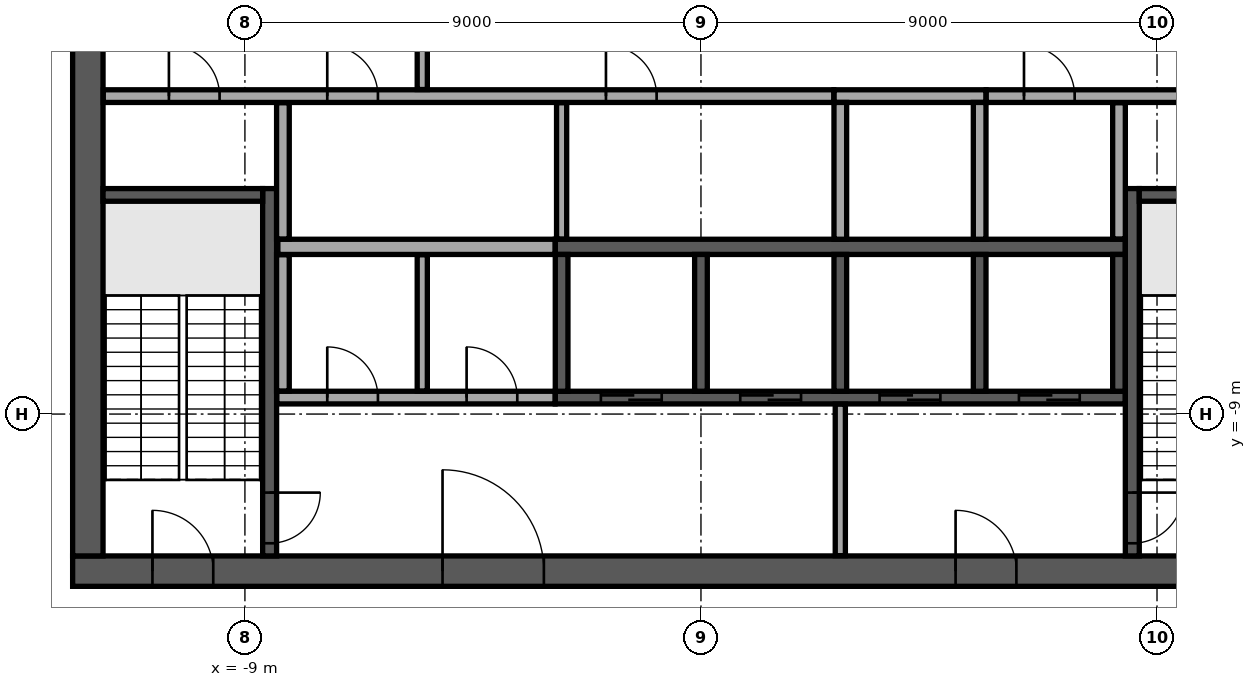
"""IFC4 building model, lengths in metres.
Left out: names, types, materials, properties, quantities, classifications, styles, units other than length and angle.
Written with IfcOpenShell. Run it as: python <this file> out.ifc"""

import sys

from ifc_helpers import new_model, si_unit, direction, frame, frame_2d, origin, place, context, subcontext, project, spatial, rectangle, extrude, element, fill, save


model = new_model("IFC4")
c1 = context("Model", 3, precision=1e-05, world=origin(), true_north=direction((0.0, 1.0)))
c2 = subcontext(c1, "Body", "Model", "MODEL_VIEW")
j1 = project(units=[si_unit("LENGTHUNIT", "METRE"), si_unit("PLANEANGLEUNIT", "RADIAN")], contexts=[c1])
p1 = place(None, origin())
s1 = spatial("IfcSite", under=j1, at=p1, CompositionType="ELEMENT")
p2 = place(p1, origin())
s2 = spatial("IfcBuilding", under=s1, at=p2, CompositionType="ELEMENT")
p3 = place(p2, frame((0.0, 0.0, 363.1)))
s3 = spatial("IfcBuildingStorey", under=s2, at=p3, CompositionType="ELEMENT", Elevation=363.1)
p4 = place(p3, frame((-12.4, -12.1, 0.0), z_axis=(0.0, 0.0, 1.0), x_axis=(1.0, 0.0, 0.0)))
e1 = element("IfcWall", 1, at=p4, inside=s3, PredefinedType="SHEAR", context=c2, shape_type="SweptSolid", body=[
    extrude(rectangle(XDim=24.8, YDim=0.6, at=frame_2d((12.4, 0.0))), origin(), (0.0, 0.0, 1.0), 4.7),
])
p5 = place(p4, frame((7.3, 0.0, 0.0)))
e2 = element("IfcOpeningElement", 2, at=p5, cuts=e1, PredefinedType="OPENING", context=c2, shape_type="SweptSolid", body=[
    extrude(rectangle(XDim=2.0, YDim=2.1, at=frame_2d((1.0, 1.05))), frame((0.0, 0.31, 0.0), z_axis=(0.0, -1.0, 0.0), x_axis=(1.0, 0.0, 0.0)), (0.0, 0.0, 1.0), 0.62),
])
p6 = place(p4, frame((17.425, 0.0, 0.0)))
e3 = element("IfcOpeningElement", 3, at=p6, cuts=e1, PredefinedType="OPENING", context=c2, shape_type="SweptSolid", body=[
    extrude(rectangle(XDim=1.2, YDim=2.1, at=frame_2d((0.6, 1.05))), frame((0.0, 0.31, 0.0), z_axis=(0.0, -1.0, 0.0), x_axis=(1.0, 0.0, 0.0)), (0.0, 0.0, 1.0), 0.62),
])
p7 = place(p4, frame((1.575, 0.0, 0.0)))
e4 = element("IfcOpeningElement", 4, at=p7, cuts=e1, PredefinedType="OPENING", context=c2, shape_type="SweptSolid", body=[
    extrude(rectangle(XDim=1.2, YDim=2.1, at=frame_2d((0.6, 1.05))), frame((0.0, 0.31, 0.0), z_axis=(0.0, -1.0, 0.0), x_axis=(1.0, 0.0, 0.0)), (0.0, 0.0, 1.0), 0.62),
])
p8 = place(p4, frame((22.025, 0.0, 0.0)))
e5 = element("IfcOpeningElement", 5, at=p8, cuts=e1, PredefinedType="OPENING", context=c2, shape_type="SweptSolid", body=[
    extrude(rectangle(XDim=1.2, YDim=2.1, at=frame_2d((0.6, 1.05))), frame((0.0, 0.31, 0.0), z_axis=(0.0, -1.0, 0.0), x_axis=(1.0, 0.0, 0.0)), (0.0, 0.0, 1.0), 0.62),
])
p9 = place(p3, frame((-12.1, -11.8, 0.0), z_axis=(0.0, 0.0, 1.0), x_axis=(0.0, 1.0, 0.0)))
e6 = element("IfcWall", 6, at=p9, inside=s3, PredefinedType="SHEAR", context=c2, shape_type="SweptSolid", body=[
    extrude(rectangle(XDim=23.6, YDim=0.6, at=frame_2d((11.8, 0.0))), origin(), (0.0, 0.0, 1.0), 4.7),
])
p10 = place(p9, frame((10.6, 0.0, 0.0)))
e7 = element("IfcOpeningElement", 7, at=p10, cuts=e6, PredefinedType="OPENING", context=c2, shape_type="SweptSolid", body=[
    extrude(rectangle(XDim=2.4, YDim=2.4, at=frame_2d((1.2, 1.2))), frame((0.0, 0.31, 0.0), z_axis=(0.0, -1.0, 0.0), x_axis=(1.0, 0.0, 0.0)), (0.0, 0.0, 1.0), 0.62),
])
p11 = place(p3, frame((-2.875, -5.7, 0.0), z_axis=(0.0, 0.0, 1.0), x_axis=(1.0, 0.0, 0.0)))
e8 = element("IfcWall", 8, at=p11, inside=s3, PredefinedType="SOLIDWALL", context=c2, shape_type="SweptSolid", body=[
    extrude(rectangle(XDim=11.25, YDim=0.3, at=frame_2d((5.625, 0.0))), origin(), (0.0, 0.0, 1.0), 4.7),
])
p12 = place(p3, frame((2.625, -2.725, 0.0), z_axis=(0.0, 0.0, 1.0), x_axis=(1.0, 0.0, 0.0)))
e9 = element("IfcWall", 9, at=p12, inside=s3, PredefinedType="SOLIDWALL", context=c2, shape_type="SweptSolid", body=[
    extrude(rectangle(XDim=3.0, YDim=0.25, at=frame_2d((1.5, 0.0))), origin(), (0.0, 0.0, 1.0), 4.7),
])
for number, where, z_axis, x_axis in (
    (10, (2.75, -5.55, 0.0), (0.0, 0.0, 1.0), (0.0, 1.0, 0.0)),
    (11, (5.5, -5.55, 0.0), (0.0, 0.0, 1.0), (0.0, 1.0, 0.0)),
):
    element("IfcWall", number, at=place(p3, frame(where, z_axis=z_axis, x_axis=x_axis)), inside=s3, PredefinedType="SOLIDWALL", context=c2, shape_type="SweptSolid", body=[
        extrude(rectangle(XDim=2.7, YDim=0.25, at=frame_2d((1.35, 0.0))), origin(), (0.0, 0.0, 1.0), 4.7),
    ])
p13 = place(p3, frame((-2.875, -8.675, 0.0), z_axis=(0.0, 0.0, 1.0), x_axis=(1.0, 0.0, 0.0)))
e12 = element("IfcWall", 12, at=p13, inside=s3, PredefinedType="SOLIDWALL", context=c2, shape_type="SweptSolid", body=[
    extrude(rectangle(XDim=11.25, YDim=0.25, at=frame_2d((5.625, 0.0))), origin(), (0.0, 0.0, 1.0), 4.7),
])
p14 = place(p13, frame((0.9, 0.0, 0.0)))
e13 = element("IfcOpeningElement", 13, at=p14, cuts=e12, PredefinedType="OPENING", context=c2, shape_type="SweptSolid", body=[
    extrude(rectangle(XDim=1.2, YDim=2.1, at=frame_2d((0.6, 1.05))), frame((0.0, 0.135, 0.0), z_axis=(0.0, -1.0, 0.0), x_axis=(1.0, 0.0, 0.0)), (0.0, 0.0, 1.0), 0.27),
])
p15 = place(p13, frame((3.65, 0.0, 0.0)))
e14 = element("IfcOpeningElement", 14, at=p15, cuts=e12, PredefinedType="OPENING", context=c2, shape_type="SweptSolid", body=[
    extrude(rectangle(XDim=1.2, YDim=2.1, at=frame_2d((0.6, 1.05))), frame((0.0, 0.135, 0.0), z_axis=(0.0, -1.0, 0.0), x_axis=(1.0, 0.0, 0.0)), (0.0, 0.0, 1.0), 0.27),
])
p16 = place(p13, frame((6.4, 0.0, 0.0)))
e15 = element("IfcOpeningElement", 15, at=p16, cuts=e12, PredefinedType="OPENING", context=c2, shape_type="SweptSolid", body=[
    extrude(rectangle(XDim=1.2, YDim=2.1, at=frame_2d((0.6, 1.05))), frame((0.0, 0.135, 0.0), z_axis=(0.0, -1.0, 0.0), x_axis=(1.0, 0.0, 0.0)), (0.0, 0.0, 1.0), 0.27),
])
p17 = place(p13, frame((9.15, 0.0, 0.0)))
e16 = element("IfcOpeningElement", 16, at=p17, cuts=e12, PredefinedType="OPENING", context=c2, shape_type="SweptSolid", body=[
    extrude(rectangle(XDim=1.2, YDim=2.1, at=frame_2d((0.6, 1.05))), frame((0.0, 0.135, 0.0), z_axis=(0.0, -1.0, 0.0), x_axis=(1.0, 0.0, 0.0)), (0.0, 0.0, 1.0), 0.27),
])
for number, where, z_axis, x_axis in (
    (17, (-2.75, -8.55, 0.0), (0.0, 0.0, 1.0), (0.0, 1.0, 0.0)),
    (18, (0.0, -8.55, 0.0), (0.0, 0.0, 1.0), (0.0, 1.0, 0.0)),
    (19, (2.75, -8.55, 0.0), (0.0, 0.0, 1.0), (0.0, 1.0, 0.0)),
    (20, (5.5, -8.55, 0.0), (0.0, 0.0, 1.0), (0.0, 1.0, 0.0)),
    (21, (8.25, -8.55, 0.0), (0.0, 0.0, 1.0), (0.0, 1.0, 0.0)),
):
    element("IfcWall", number, at=place(p3, frame(where, z_axis=z_axis, x_axis=x_axis)), inside=s3, PredefinedType="SOLIDWALL", context=c2, shape_type="SweptSolid", body=[
        extrude(rectangle(XDim=2.7, YDim=0.25, at=frame_2d((1.35, 0.0))), origin(), (0.0, 0.0, 1.0), 4.7),
    ])
p18 = place(p3, frame((-8.512, -4.55, 0.0), z_axis=(0.0, 0.0, 1.0), x_axis=(0.0, -1.0, 0.0)))
e22 = element("IfcWall", 22, at=p18, inside=s3, PredefinedType="SOLIDWALL", context=c2, shape_type="SweptSolid", body=[
    extrude(rectangle(XDim=7.25, YDim=0.275, at=frame_2d((3.625, 0.0))), origin(), (0.0, 0.0, 1.0), 4.7),
])
p19 = place(p18, frame((6.0, 0.0, 0.0)))
e23 = element("IfcOpeningElement", 23, at=p19, cuts=e22, PredefinedType="OPENING", context=c2, shape_type="SweptSolid", body=[
    extrude(rectangle(XDim=1.0, YDim=2.1, at=frame_2d((0.5, 1.05))), frame((0.0, 0.147, 0.0), z_axis=(0.0, -1.0, 0.0), x_axis=(1.0, 0.0, 0.0)), (0.0, 0.0, 1.0), 0.295),
])
p20 = place(p3, frame((-8.65, -4.675, 0.0), z_axis=(0.0, 0.0, 1.0), x_axis=(-1.0, 0.0, 0.0)))
e24 = element("IfcWall", 24, at=p20, inside=s3, PredefinedType="SOLIDWALL", context=c2, shape_type="SweptSolid", body=[
    extrude(rectangle(XDim=3.15, YDim=0.25, at=frame_2d((1.575, 0.0))), origin(), (0.0, 0.0, 1.0), 4.7),
])
p21 = place(p3, frame((8.512, -4.55, 0.0), z_axis=(0.0, 0.0, 1.0), x_axis=(0.0, -1.0, 0.0)))
e25 = element("IfcWall", 25, at=p21, inside=s3, PredefinedType="SOLIDWALL", context=c2, shape_type="SweptSolid", body=[
    extrude(rectangle(XDim=7.25, YDim=0.275, at=frame_2d((3.625, 0.0))), origin(), (0.0, 0.0, 1.0), 4.7),
])
p22 = place(p21, frame((6.0, 0.0, 0.0)))
e26 = element("IfcOpeningElement", 26, at=p22, cuts=e25, PredefinedType="OPENING", context=c2, shape_type="SweptSolid", body=[
    extrude(rectangle(XDim=1.0, YDim=2.1, at=frame_2d((0.5, 1.05))), frame((0.0, 0.147, 0.0), z_axis=(0.0, -1.0, 0.0), x_axis=(1.0, 0.0, 0.0)), (0.0, 0.0, 1.0), 0.295),
])
p23 = place(p3, frame((8.65, -4.675, 0.0), z_axis=(0.0, 0.0, 1.0), x_axis=(1.0, 0.0, 0.0)))
e27 = element("IfcWall", 27, at=p23, inside=s3, PredefinedType="SOLIDWALL", context=c2, shape_type="SweptSolid", body=[
    extrude(rectangle(XDim=3.15, YDim=0.25, at=frame_2d((1.575, 0.0))), origin(), (0.0, 0.0, 1.0), 4.7),
])
p24 = place(p3, frame((2.75, -11.795, 0.0), z_axis=(0.0, 0.0, 1.0), x_axis=(0.0, 1.0, 0.0)))
e28 = element("IfcWall", 28, at=p24, inside=s3, PredefinedType="PARTITIONING", context=c2, shape_type="SweptSolid", body=[
    extrude(rectangle(XDim=2.99, YDim=0.2, at=frame_2d((1.495, 0.0))), origin(), (0.0, 0.0, 1.0), 4.7),
])
p25 = place(p3, frame((-8.37, -8.675, 0.0), z_axis=(0.0, 0.0, 1.0), x_axis=(1.0, 0.0, 0.0)))
e29 = element("IfcWall", 29, at=p25, inside=s3, PredefinedType="PARTITIONING", context=c2, shape_type="SweptSolid", body=[
    extrude(rectangle(XDim=5.49, YDim=0.25, at=frame_2d((2.745, 0.0))), origin(), (0.0, 0.0, 1.0), 4.7),
])
p26 = place(p25, frame((0.995, 0.0, 0.0)))
e30 = element("IfcOpeningElement", 30, at=p26, cuts=e29, PredefinedType="OPENING", context=c2, shape_type="SweptSolid", body=[
    extrude(rectangle(XDim=1.0, YDim=2.1, at=frame_2d((0.5, 1.05))), frame((0.0, 0.135, 0.0), z_axis=(0.0, -1.0, 0.0), x_axis=(1.0, 0.0, 0.0)), (0.0, 0.0, 1.0), 0.27),
])
p27 = place(p25, frame((3.745, 0.0, 0.0)))
e31 = element("IfcOpeningElement", 31, at=p27, cuts=e29, PredefinedType="OPENING", context=c2, shape_type="SweptSolid", body=[
    extrude(rectangle(XDim=1.0, YDim=2.1, at=frame_2d((0.5, 1.05))), frame((0.0, 0.135, 0.0), z_axis=(0.0, -1.0, 0.0), x_axis=(1.0, 0.0, 0.0)), (0.0, 0.0, 1.0), 0.27),
])
p28 = place(p3, frame((-8.25, -8.545, 0.0), z_axis=(0.0, 0.0, 1.0), x_axis=(0.0, 1.0, 0.0)))
e32 = element("IfcWall", 32, at=p28, inside=s3, PredefinedType="PARTITIONING", context=c2, shape_type="SweptSolid", body=[
    extrude(rectangle(XDim=2.69, YDim=0.25, at=frame_2d((1.345, 0.0))), origin(), (0.0, 0.0, 1.0), 4.7),
])
p29 = place(p3, frame((-5.5, -8.545, 0.0), z_axis=(0.0, 0.0, 1.0), x_axis=(0.0, 1.0, 0.0)))
e33 = element("IfcWall", 33, at=p29, inside=s3, PredefinedType="PARTITIONING", context=c2, shape_type="SweptSolid", body=[
    extrude(rectangle(XDim=2.69, YDim=0.2, at=frame_2d((1.345, 0.0))), origin(), (0.0, 0.0, 1.0), 4.7),
])
p30 = place(p3, frame((-8.35, -5.7, 0.0), z_axis=(0.0, 0.0, 1.0), x_axis=(1.0, 0.0, 0.0)))
e34 = element("IfcWall", 34, at=p30, inside=s3, PredefinedType="PARTITIONING", context=c2, shape_type="SweptSolid", body=[
    extrude(rectangle(XDim=5.47, YDim=0.3, at=frame_2d((2.735, 0.0))), origin(), (0.0, 0.0, 1.0), 4.7),
])
p31 = place(p3, frame((-8.25, -5.545, 0.0), z_axis=(0.0, 0.0, 1.0), x_axis=(0.0, 1.0, 0.0)))
e35 = element("IfcWall", 35, at=p31, inside=s3, PredefinedType="PARTITIONING", context=c2, shape_type="SweptSolid", body=[
    extrude(rectangle(XDim=2.69, YDim=0.25, at=frame_2d((1.345, 0.0))), origin(), (0.0, 0.0, 1.0), 4.7),
])
p32 = place(p3, frame((-2.75, -5.545, 0.0), z_axis=(0.0, 0.0, 1.0), x_axis=(0.0, 1.0, 0.0)))
e36 = element("IfcWall", 36, at=p32, inside=s3, PredefinedType="PARTITIONING", context=c2, shape_type="SweptSolid", body=[
    extrude(rectangle(XDim=2.69, YDim=0.2, at=frame_2d((1.345, 0.0))), origin(), (0.0, 0.0, 1.0), 4.7),
])
p33 = place(p3, frame((8.25, -5.545, 0.0), z_axis=(0.0, 0.0, 1.0), x_axis=(0.0, 1.0, 0.0)))
e37 = element("IfcWall", 37, at=p33, inside=s3, PredefinedType="PARTITIONING", context=c2, shape_type="SweptSolid", body=[
    extrude(rectangle(XDim=2.69, YDim=0.25, at=frame_2d((1.345, 0.0))), origin(), (0.0, 0.0, 1.0), 4.7),
])
p34 = place(p3, frame((-11.795, -2.725, 0.0), z_axis=(0.0, 0.0, 1.0), x_axis=(1.0, 0.0, 0.0)))
e38 = element("IfcWall", 38, at=p34, inside=s3, PredefinedType="PARTITIONING", context=c2, shape_type="SweptSolid", body=[
    extrude(rectangle(XDim=14.415, YDim=0.25, at=frame_2d((7.208, 0.0))), origin(), (0.0, 0.0, 1.0), 4.7),
])
p35 = place(p34, frame((1.295, 0.0, 0.0)))
e39 = element("IfcOpeningElement", 39, at=p35, cuts=e38, PredefinedType="OPENING", context=c2, shape_type="SweptSolid", body=[
    extrude(rectangle(XDim=1.0, YDim=2.1, at=frame_2d((0.5, 1.05))), frame((0.0, 0.135, 0.0), z_axis=(0.0, -1.0, 0.0), x_axis=(1.0, 0.0, 0.0)), (0.0, 0.0, 1.0), 0.27),
])
p36 = place(p34, frame((4.42, 0.0, 0.0)))
e40 = element("IfcOpeningElement", 40, at=p36, cuts=e38, PredefinedType="OPENING", context=c2, shape_type="SweptSolid", body=[
    extrude(rectangle(XDim=1.0, YDim=2.1, at=frame_2d((0.5, 1.05))), frame((0.0, 0.135, 0.0), z_axis=(0.0, -1.0, 0.0), x_axis=(1.0, 0.0, 0.0)), (0.0, 0.0, 1.0), 0.27),
])
p37 = place(p34, frame((9.92, 0.0, 0.0)))
e41 = element("IfcOpeningElement", 41, at=p37, cuts=e38, PredefinedType="OPENING", context=c2, shape_type="SweptSolid", body=[
    extrude(rectangle(XDim=1.0, YDim=2.1, at=frame_2d((0.5, 1.05))), frame((0.0, 0.135, 0.0), z_axis=(0.0, -1.0, 0.0), x_axis=(1.0, 0.0, 0.0)), (0.0, 0.0, 1.0), 0.27),
])
p38 = place(p3, frame((5.63, -2.725, 0.0), z_axis=(0.0, 0.0, 1.0), x_axis=(1.0, 0.0, 0.0)))
e42 = element("IfcWall", 42, at=p38, inside=s3, PredefinedType="PARTITIONING", context=c2, shape_type="SweptSolid", body=[
    extrude(rectangle(XDim=6.165, YDim=0.25, at=frame_2d((3.083, 0.0))), origin(), (0.0, 0.0, 1.0), 4.7),
])
p39 = place(p38, frame((0.745, 0.0, 0.0)))
e43 = element("IfcOpeningElement", 43, at=p39, cuts=e42, PredefinedType="OPENING", context=c2, shape_type="SweptSolid", body=[
    extrude(rectangle(XDim=1.0, YDim=2.1, at=frame_2d((0.5, 1.05))), frame((0.0, 0.135, 0.0), z_axis=(0.0, -1.0, 0.0), x_axis=(1.0, 0.0, 0.0)), (0.0, 0.0, 1.0), 0.27),
])
p40 = place(p38, frame((3.92, 0.0, 0.0)))
e44 = element("IfcOpeningElement", 44, at=p40, cuts=e42, PredefinedType="OPENING", context=c2, shape_type="SweptSolid", body=[
    extrude(rectangle(XDim=0.9, YDim=2.1, at=frame_2d((0.45, 1.05))), frame((0.0, 0.135, 0.0), z_axis=(0.0, -1.0, 0.0), x_axis=(1.0, 0.0, 0.0)), (0.0, 0.0, 1.0), 0.27),
])
p41 = place(p3, frame((-5.5, -2.595, 0.0), z_axis=(0.0, 0.0, 1.0), x_axis=(0.0, 1.0, 0.0)))
e45 = element("IfcWall", 45, at=p41, inside=s3, PredefinedType="PARTITIONING", context=c2, shape_type="SweptSolid", body=[
    extrude(rectangle(XDim=5.19, YDim=0.2, at=frame_2d((2.595, 0.0))), origin(), (0.0, 0.0, 1.0), 4.7),
])
p42 = place(p41, frame((1.395, 0.0, 0.0)))
e46 = element("IfcOpeningElement", 46, at=p42, cuts=e45, PredefinedType="OPENING", context=c2, shape_type="SweptSolid", body=[
    extrude(rectangle(XDim=2.4, YDim=2.4, at=frame_2d((1.2, 1.2))), frame((0.0, 0.11, 0.0), z_axis=(0.0, -1.0, 0.0), x_axis=(1.0, 0.0, 0.0)), (0.0, 0.0, 1.0), 0.22),
])
p43 = place(p5, origin())
e47 = element("IfcDoor", 47, at=p43, inside=s3, OperationType="SINGLE_SWING_LEFT", PredefinedType="DOOR", context=c2, shape_type="SweptSolid", body=[
    extrude(rectangle(XDim=2.0, YDim=2.1, at=frame_2d((1.0, 1.05))), frame((0.0, 0.025, 0.0), z_axis=(0.0, -1.0, 0.0), x_axis=(1.0, 0.0, 0.0)), (0.0, 0.0, 1.0), 0.05),
])
fill(e2, e47)
p44 = place(p6, origin())
e48 = element("IfcDoor", 48, at=p44, inside=s3, OperationType="SINGLE_SWING_LEFT", PredefinedType="DOOR", context=c2, shape_type="SweptSolid", body=[
    extrude(rectangle(XDim=1.2, YDim=2.1, at=frame_2d((0.6, 1.05))), frame((0.0, 0.025, 0.0), z_axis=(0.0, -1.0, 0.0), x_axis=(1.0, 0.0, 0.0)), (0.0, 0.0, 1.0), 0.05),
])
fill(e3, e48)
p45 = place(p7, origin())
e49 = element("IfcDoor", 49, at=p45, inside=s3, OperationType="SINGLE_SWING_LEFT", PredefinedType="DOOR", context=c2, shape_type="SweptSolid", body=[
    extrude(rectangle(XDim=1.2, YDim=2.1, at=frame_2d((0.6, 1.05))), frame((0.0, 0.025, 0.0), z_axis=(0.0, -1.0, 0.0), x_axis=(1.0, 0.0, 0.0)), (0.0, 0.0, 1.0), 0.05),
])
fill(e4, e49)
p46 = place(p14, origin())
e50 = element("IfcDoor", 50, at=p46, inside=s3, OperationType="DOUBLE_DOOR_SLIDING", PredefinedType="DOOR", context=c2, shape_type="SweptSolid", body=[
    extrude(rectangle(XDim=1.2, YDim=2.1, at=frame_2d((0.6, 1.05))), frame((0.0, 0.025, 0.0), z_axis=(0.0, -1.0, 0.0), x_axis=(1.0, 0.0, 0.0)), (0.0, 0.0, 1.0), 0.05),
])
fill(e13, e50)
p47 = place(p15, origin())
e51 = element("IfcDoor", 51, at=p47, inside=s3, OperationType="DOUBLE_DOOR_SLIDING", PredefinedType="DOOR", context=c2, shape_type="SweptSolid", body=[
    extrude(rectangle(XDim=1.2, YDim=2.1, at=frame_2d((0.6, 1.05))), frame((0.0, 0.025, 0.0), z_axis=(0.0, -1.0, 0.0), x_axis=(1.0, 0.0, 0.0)), (0.0, 0.0, 1.0), 0.05),
])
fill(e14, e51)
p48 = place(p16, origin())
e52 = element("IfcDoor", 52, at=p48, inside=s3, OperationType="DOUBLE_DOOR_SLIDING", PredefinedType="DOOR", context=c2, shape_type="SweptSolid", body=[
    extrude(rectangle(XDim=1.2, YDim=2.1, at=frame_2d((0.6, 1.05))), frame((0.0, 0.025, 0.0), z_axis=(0.0, -1.0, 0.0), x_axis=(1.0, 0.0, 0.0)), (0.0, 0.0, 1.0), 0.05),
])
fill(e15, e52)
p49 = place(p17, origin())
e53 = element("IfcDoor", 53, at=p49, inside=s3, OperationType="DOUBLE_DOOR_SLIDING", PredefinedType="DOOR", context=c2, shape_type="SweptSolid", body=[
    extrude(rectangle(XDim=1.2, YDim=2.1, at=frame_2d((0.6, 1.05))), frame((0.0, 0.025, 0.0), z_axis=(0.0, -1.0, 0.0), x_axis=(1.0, 0.0, 0.0)), (0.0, 0.0, 1.0), 0.05),
])
fill(e16, e53)
p50 = place(p19, origin())
e54 = element("IfcDoor", 54, at=p50, inside=s3, OperationType="SINGLE_SWING_LEFT", PredefinedType="DOOR", context=c2, shape_type="SweptSolid", body=[
    extrude(rectangle(XDim=1.0, YDim=2.1, at=frame_2d((0.5, 1.05))), frame((0.0, 0.025, 0.0), z_axis=(0.0, -1.0, 0.0), x_axis=(1.0, 0.0, 0.0)), (0.0, 0.0, 1.0), 0.05),
])
fill(e23, e54)
p51 = place(p22, origin())
e55 = element("IfcDoor", 55, at=p51, inside=s3, OperationType="SINGLE_SWING_LEFT", PredefinedType="DOOR", context=c2, shape_type="SweptSolid", body=[
    extrude(rectangle(XDim=1.0, YDim=2.1, at=frame_2d((0.5, 1.05))), frame((0.0, 0.025, 0.0), z_axis=(0.0, -1.0, 0.0), x_axis=(1.0, 0.0, 0.0)), (0.0, 0.0, 1.0), 0.05),
])
fill(e26, e55)
p52 = place(p26, origin())
e56 = element("IfcDoor", 56, at=p52, inside=s3, OperationType="SINGLE_SWING_RIGHT", PredefinedType="DOOR", context=c2, shape_type="SweptSolid", body=[
    extrude(rectangle(XDim=1.0, YDim=2.1, at=frame_2d((0.5, 1.05))), frame((0.0, 0.025, 0.0), z_axis=(0.0, -1.0, 0.0), x_axis=(1.0, 0.0, 0.0)), (0.0, 0.0, 1.0), 0.05),
])
fill(e30, e56)
p53 = place(p27, origin())
e57 = element("IfcDoor", 57, at=p53, inside=s3, OperationType="SINGLE_SWING_RIGHT", PredefinedType="DOOR", context=c2, shape_type="SweptSolid", body=[
    extrude(rectangle(XDim=1.0, YDim=2.1, at=frame_2d((0.5, 1.05))), frame((0.0, 0.025, 0.0), z_axis=(0.0, -1.0, 0.0), x_axis=(1.0, 0.0, 0.0)), (0.0, 0.0, 1.0), 0.05),
])
fill(e31, e57)
p54 = place(p35, origin())
e58 = element("IfcDoor", 58, at=p54, inside=s3, OperationType="SINGLE_SWING_RIGHT", PredefinedType="DOOR", context=c2, shape_type="SweptSolid", body=[
    extrude(rectangle(XDim=1.0, YDim=2.1, at=frame_2d((0.5, 1.05))), frame((0.0, 0.025, 0.0), z_axis=(0.0, -1.0, 0.0), x_axis=(1.0, 0.0, 0.0)), (0.0, 0.0, 1.0), 0.05),
])
fill(e39, e58)
p55 = place(p39, origin())
e59 = element("IfcDoor", 59, at=p55, inside=s3, OperationType="SINGLE_SWING_RIGHT", PredefinedType="DOOR", context=c2, shape_type="SweptSolid", body=[
    extrude(rectangle(XDim=1.0, YDim=2.1, at=frame_2d((0.5, 1.05))), frame((0.0, 0.025, 0.0), z_axis=(0.0, -1.0, 0.0), x_axis=(1.0, 0.0, 0.0)), (0.0, 0.0, 1.0), 0.05),
])
fill(e43, e59)
p56 = place(p36, origin())
e60 = element("IfcDoor", 60, at=p56, inside=s3, OperationType="SINGLE_SWING_RIGHT", PredefinedType="DOOR", context=c2, shape_type="SweptSolid", body=[
    extrude(rectangle(XDim=1.0, YDim=2.1, at=frame_2d((0.5, 1.05))), frame((0.0, 0.025, 0.0), z_axis=(0.0, -1.0, 0.0), x_axis=(1.0, 0.0, 0.0)), (0.0, 0.0, 1.0), 0.05),
])
fill(e40, e60)
p57 = place(p37, origin())
e61 = element("IfcDoor", 61, at=p57, inside=s3, OperationType="SINGLE_SWING_RIGHT", PredefinedType="DOOR", context=c2, shape_type="SweptSolid", body=[
    extrude(rectangle(XDim=1.0, YDim=2.1, at=frame_2d((0.5, 1.05))), frame((0.0, 0.025, 0.0), z_axis=(0.0, -1.0, 0.0), x_axis=(1.0, 0.0, 0.0)), (0.0, 0.0, 1.0), 0.05),
])
fill(e41, e61)
save(model, sys.argv[1])
